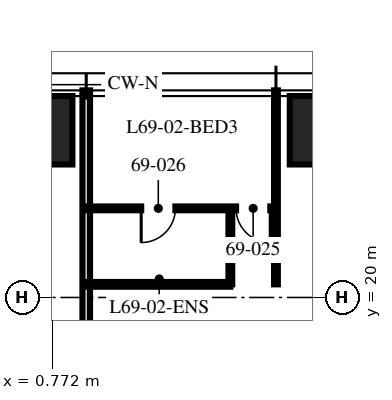
"""IFC4 building model, lengths in metres.
Left out: names, types, materials, properties, quantities, classifications, styles, units other than length and angle.
Written with IfcOpenShell. Run it as: python <this file> out.ifc"""

import sys

from ifc_helpers import new_model, si_unit, direction, frame, frame_2d, origin, origin_2d, place, context, subcontext, project, spatial, rectangle, hollow_rectangle, extrude, element, fill, save


model = new_model("IFC4")
c1 = context("Model", 3, precision=1e-05, world=origin(), true_north=direction((0.0, 1.0)))
c2 = subcontext(c1, "Body", "Model", "MODEL_VIEW")
j1 = project(units=[si_unit("LENGTHUNIT", "METRE"), si_unit("PLANEANGLEUNIT", "RADIAN")], contexts=[c1])
p1 = place(None, origin())
s1 = spatial("IfcSite", under=j1, at=p1, CompositionType="ELEMENT")
p2 = place(p1, origin())
s2 = spatial("IfcBuilding", under=s1, at=p2, CompositionType="ELEMENT")
p3 = place(p2, frame((0.0, 0.0, 274.5)))
s3 = spatial("IfcBuildingStorey", under=s2, at=p3, CompositionType="ELEMENT", Elevation=274.5)
p4 = place(p3, frame((0.0, 24.4, 0.0), z_axis=(0.0, 0.0, 1.0), x_axis=(1.0, 0.0, 0.0)))
e1 = element("IfcColumn", 1, at=p4, inside=s3, PredefinedType="COLUMN", context=c2, shape_type="SweptSolid", body=[
    extrude(hollow_rectangle(XDim=2.6, YDim=1.8, WallThickness=0.14, at=origin_2d()), origin(), (0.0, 0.0, 1.0), 2.78),
])
p5 = place(p3, frame((8.32, 24.4, 0.0), z_axis=(0.0, 0.0, 1.0), x_axis=(1.0, 0.0, 0.0)))
e2 = element("IfcColumn", 2, at=p5, inside=s3, PredefinedType="COLUMN", context=c2, shape_type="SweptSolid", body=[
    extrude(hollow_rectangle(XDim=2.6, YDim=1.8, WallThickness=0.14, at=origin_2d()), origin(), (0.0, 0.0, 1.0), 2.64),
])
p6 = place(p3, frame((6.656, 20.345, 0.0), z_axis=(0.0, 0.0, 1.0), x_axis=(0.0, 1.0, 0.0)))
e3 = element("IfcWall", 3, at=p6, inside=s3, PredefinedType="PARTITIONING", context=c2, shape_type="SweptSolid", body=[
    extrude(rectangle(XDim=5.105, YDim=0.1, at=frame_2d((2.552, 0.0))), origin(), (0.0, 0.0, 1.0), 2.75),
])
p7 = place(p3, frame((1.664, 12.8, 0.0), z_axis=(0.0, 0.0, 1.0), x_axis=(0.0, 1.0, 0.0)))
e4 = element("IfcWall", 4, at=p7, inside=s3, PredefinedType="PARTITIONING", context=c2, shape_type="SweptSolid", body=[
    extrude(rectangle(XDim=12.65, YDim=0.2, at=frame_2d((6.325, 0.0))), origin(), (0.0, 0.0, 1.0), 2.75),
])
p8 = place(p3, frame((6.656, 22.345, 0.0), z_axis=(0.0, 0.0, 1.0), x_axis=(-1.0, 0.0, 0.0)))
e5 = element("IfcWall", 5, at=p8, inside=s3, PredefinedType="PARTITIONING", context=c2, shape_type="SweptSolid", body=[
    extrude(rectangle(XDim=4.992, YDim=0.1, at=frame_2d((2.496, 0.0))), origin(), (0.0, 0.0, 1.0), 2.2),
])
p9 = place(p8, frame((0.15, 0.0, 0.0)))
e6 = element("IfcOpeningElement", 6, at=p9, cuts=e5, PredefinedType="OPENING", context=c2, shape_type="SweptSolid", body=[
    extrude(rectangle(XDim=0.9, YDim=2.1, at=frame_2d((0.45, 1.05))), frame((0.0, 0.06, 0.0), z_axis=(0.0, -1.0, 0.0), x_axis=(1.0, 0.0, 0.0)), (0.0, 0.0, 1.0), 0.12),
])
p10 = place(p8, frame((2.646, 0.0, 0.0)))
e7 = element("IfcOpeningElement", 7, at=p10, cuts=e5, PredefinedType="OPENING", context=c2, shape_type="SweptSolid", body=[
    extrude(rectangle(XDim=0.9, YDim=2.1, at=frame_2d((0.45, 1.05))), frame((0.0, 0.06, 0.0), z_axis=(0.0, -1.0, 0.0), x_axis=(1.0, 0.0, 0.0)), (0.0, 0.0, 1.0), 0.12),
])
p11 = place(p3, frame((5.456, 20.345, 0.0), z_axis=(0.0, 0.0, 1.0), x_axis=(0.0, 1.0, 0.0)))
e8 = element("IfcWall", 8, at=p11, inside=s3, PredefinedType="PARTITIONING", context=c2, shape_type="SweptSolid", body=[
    extrude(rectangle(XDim=2.0, YDim=0.1, at=frame_2d((1.0, 0.0))), origin(), (0.0, 0.0, 1.0), 2.75),
])
p12 = place(p3, frame((5.456, 20.345, 0.0), z_axis=(0.0, 0.0, 1.0), x_axis=(-1.0, 0.0, 0.0)))
e9 = element("IfcWall", 9, at=p12, inside=s3, PredefinedType="PARTITIONING", context=c2, shape_type="SweptSolid", body=[
    extrude(rectangle(XDim=3.792, YDim=0.125, at=frame_2d((1.896, 0.0))), origin(), (0.0, 0.0, 1.0), 2.2),
])
p13 = place(p9, origin())
e10 = element("IfcDoor", 10, at=p13, inside=s3, OperationType="SINGLE_SWING_LEFT", PredefinedType="DOOR", context=c2, shape_type="SweptSolid", body=[
    extrude(rectangle(XDim=0.9, YDim=2.1, at=frame_2d((0.45, 1.05))), frame((0.0, 0.025, 0.0), z_axis=(0.0, -1.0, 0.0), x_axis=(1.0, 0.0, 0.0)), (0.0, 0.0, 1.0), 0.05),
])
fill(e6, e10)
p14 = place(p10, origin())
e11 = element("IfcDoor", 11, at=p14, inside=s3, OperationType="SINGLE_SWING_RIGHT", PredefinedType="DOOR", context=c2, shape_type="SweptSolid", body=[
    extrude(rectangle(XDim=0.9, YDim=2.1, at=frame_2d((0.45, 1.05))), frame((0.0, 0.025, 0.0), z_axis=(0.0, -1.0, 0.0), x_axis=(1.0, 0.0, 0.0)), (0.0, 0.0, 1.0), 0.05),
])
fill(e7, e11)
save(model, sys.argv[1])
